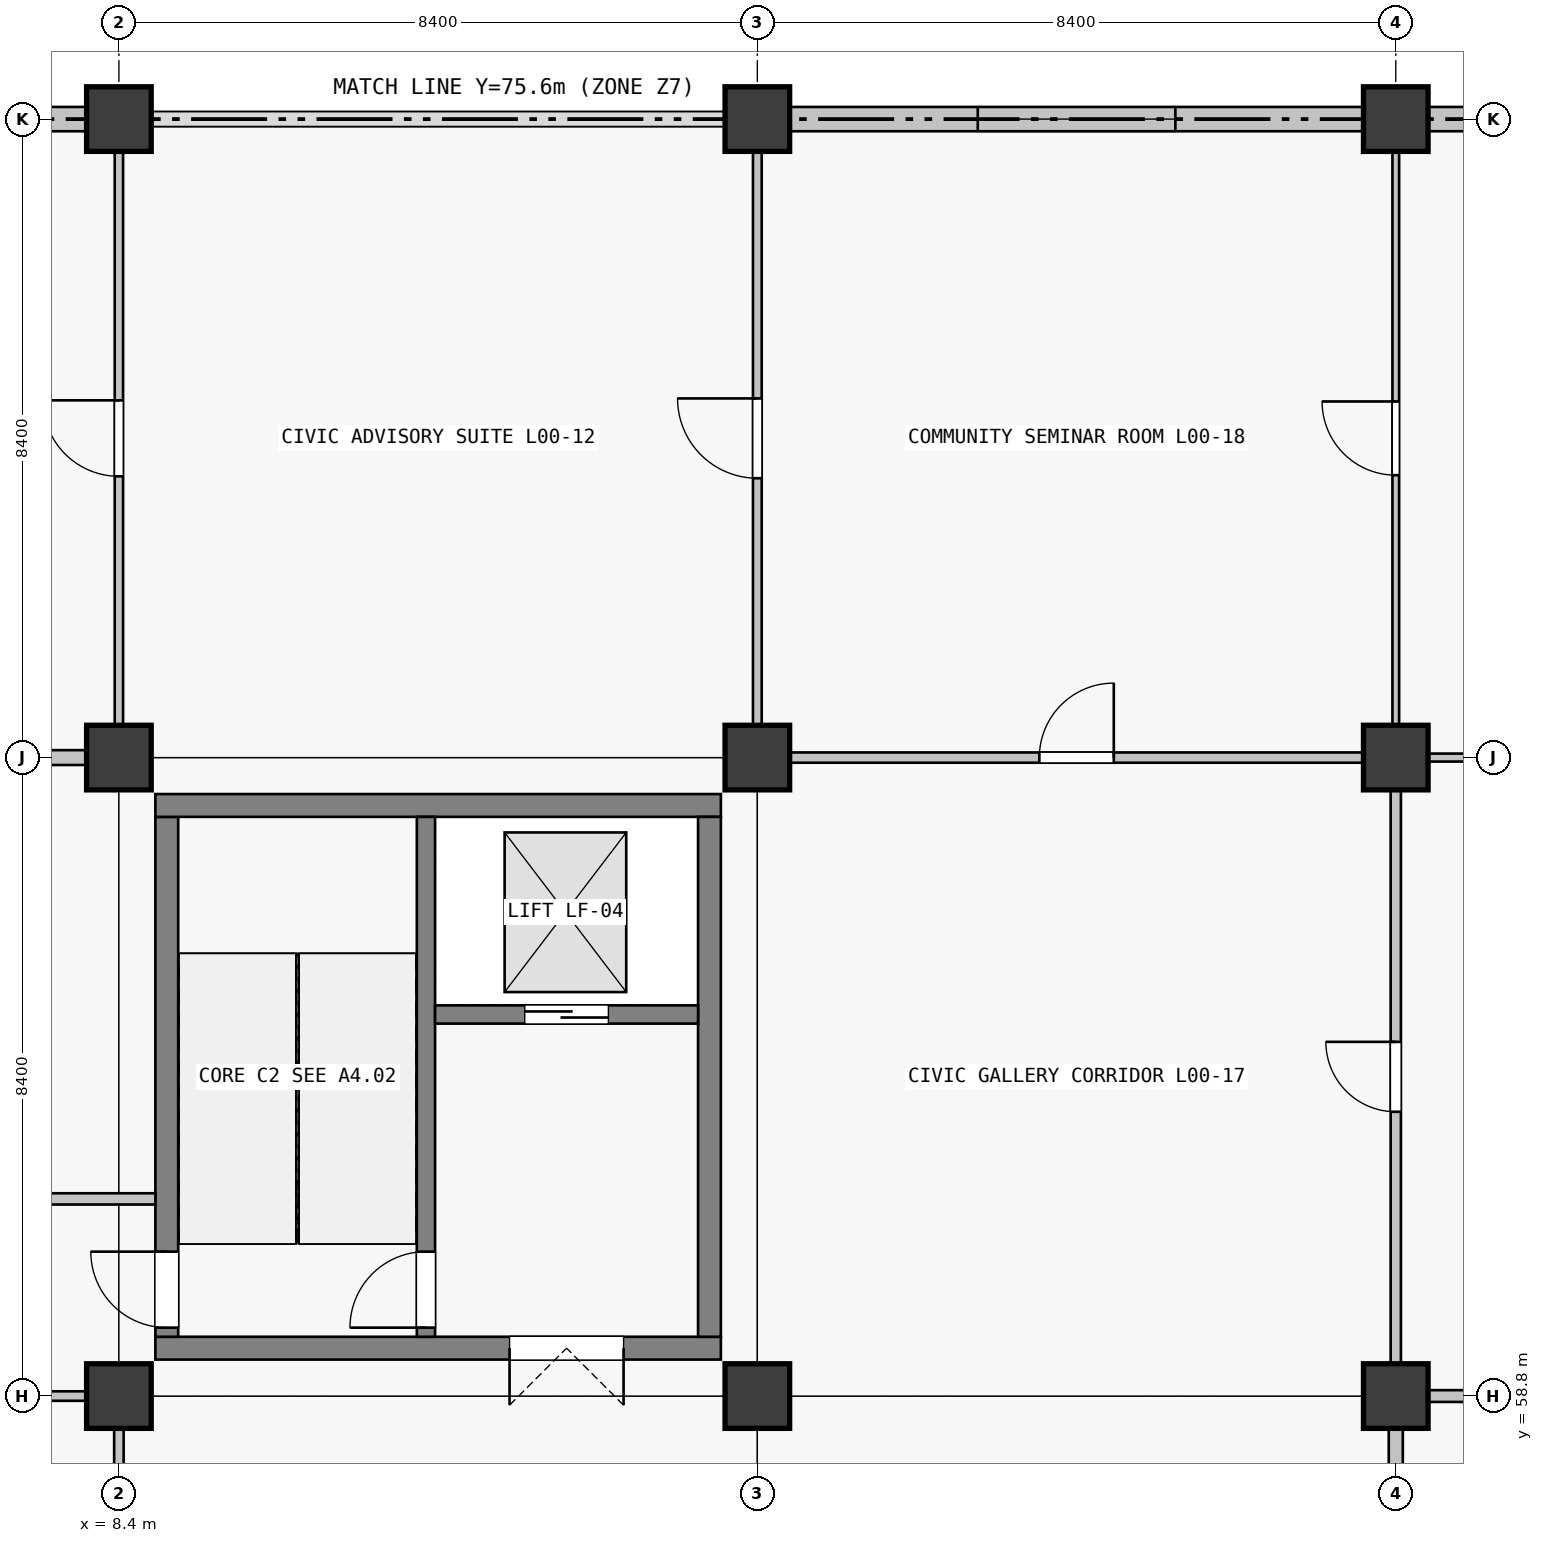
"""IFC4 building model, lengths in metres.
Left out: names, types, materials, properties, quantities, classifications, styles, units other than length and angle.
Written with IfcOpenShell. Run it as: python <this file> out.ifc"""

import sys

from ifc_helpers import new_model, si_unit, direction, frame, frame_2d, origin, origin_2d, place, context, subcontext, project, spatial, rectangle, extrude, element, fill, save


model = new_model("IFC4")
c1 = context("Model", 3, precision=1e-05, world=origin(), true_north=direction((0.0, 1.0)))
c2 = subcontext(c1, "Body", "Model", "MODEL_VIEW")
j1 = project(units=[si_unit("LENGTHUNIT", "METRE"), si_unit("PLANEANGLEUNIT", "RADIAN")], contexts=[c1])
p1 = place(None, origin())
s1 = spatial("IfcSite", under=j1, at=p1, CompositionType="ELEMENT")
p2 = place(p1, origin())
s2 = spatial("IfcBuilding", under=s1, at=p2, CompositionType="ELEMENT")
p3 = place(p2, origin())
s3 = spatial("IfcBuildingStorey", under=s2, at=p3, CompositionType="ELEMENT", Elevation=0.0)
for number, where, z_axis, x_axis in (
    (1, (8.4, 58.8, 0.0), (0.0, 0.0, 1.0), (1.0, 0.0, 0.0)),
    (2, (8.4, 67.2, 0.0), (0.0, 0.0, 1.0), (1.0, 0.0, 0.0)),
    (3, (8.4, 75.6, 0.0), (0.0, 0.0, 1.0), (1.0, 0.0, 0.0)),
    (4, (16.8, 58.8, 0.0), (0.0, 0.0, 1.0), (1.0, 0.0, 0.0)),
    (5, (16.8, 67.2, 0.0), (0.0, 0.0, 1.0), (1.0, 0.0, 0.0)),
    (6, (16.8, 75.6, 0.0), (0.0, 0.0, 1.0), (1.0, 0.0, 0.0)),
    (7, (25.2, 58.8, 0.0), (0.0, 0.0, 1.0), (1.0, 0.0, 0.0)),
    (8, (25.2, 67.2, 0.0), (0.0, 0.0, 1.0), (1.0, 0.0, 0.0)),
    (9, (25.2, 75.6, 0.0), (0.0, 0.0, 1.0), (1.0, 0.0, 0.0)),
):
    element("IfcColumn", number, at=place(p3, frame(where, z_axis=z_axis, x_axis=x_axis)), inside=s3, PredefinedType="COLUMN", context=c2, shape_type="SweptSolid", body=[
        extrude(rectangle(XDim=0.85, YDim=0.85, at=origin_2d()), origin(), (0.0, 0.0, 1.0), 5.76),
    ])
p4 = place(p3, frame((0.301, 75.6, 0.0), z_axis=(0.0, 0.0, 1.0), x_axis=(1.0, 0.0, 0.0)))
e10 = element("IfcWall", 10, at=p4, inside=s3, PredefinedType="SOLIDWALL", context=c2, shape_type="SweptSolid", body=[
    extrude(rectangle(XDim=7.673, YDim=0.32, at=frame_2d((3.836, 0.0))), origin(), (0.0, 0.0, 1.0), 4.7),
])
p5 = place(p4, frame((3.037, 0.0, 0.9)))
e11 = element("IfcOpeningElement", 11, at=p5, cuts=e10, PredefinedType="OPENING", context=c2, shape_type="SweptSolid", body=[
    extrude(rectangle(XDim=1.6, YDim=2.1, at=frame_2d((0.8, 1.05))), frame((0.0, 0.16, 0.0), z_axis=(0.0, -1.0, 0.0), x_axis=(1.0, 0.0, 0.0)), (0.0, 0.0, 1.0), 0.32),
])
p6 = place(p3, frame((17.226, 75.6, 0.0), z_axis=(0.0, 0.0, 1.0), x_axis=(1.0, 0.0, 0.0)))
e12 = element("IfcWall", 12, at=p6, inside=s3, PredefinedType="SOLIDWALL", context=c2, shape_type="SweptSolid", body=[
    extrude(rectangle(XDim=7.548, YDim=0.32, at=frame_2d((3.774, 0.0))), origin(), (0.0, 0.0, 1.0), 4.7),
])
p7 = place(p6, frame((2.474, 0.0, 0.9)))
e13 = element("IfcOpeningElement", 13, at=p7, cuts=e12, PredefinedType="OPENING", context=c2, shape_type="SweptSolid", body=[
    extrude(rectangle(XDim=2.6, YDim=2.1, at=frame_2d((1.3, 1.05))), frame((0.0, 0.16, 0.0), z_axis=(0.0, -1.0, 0.0), x_axis=(1.0, 0.0, 0.0)), (0.0, 0.0, 1.0), 0.32),
])
p8 = place(p3, frame((25.626, 75.6, 0.0), z_axis=(0.0, 0.0, 1.0), x_axis=(1.0, 0.0, 0.0)))
e14 = element("IfcWall", 14, at=p8, inside=s3, PredefinedType="SOLIDWALL", context=c2, shape_type="SweptSolid", body=[
    extrude(rectangle(XDim=7.548, YDim=0.32, at=frame_2d((3.774, 0.0))), origin(), (0.0, 0.0, 1.0), 4.7),
])
p9 = place(p8, frame((2.374, 0.0, 0.9)))
e15 = element("IfcOpeningElement", 15, at=p9, cuts=e14, PredefinedType="OPENING", context=c2, shape_type="SweptSolid", body=[
    extrude(rectangle(XDim=2.8, YDim=1.75, at=frame_2d((1.4, 0.875))), frame((0.0, 0.16, 0.0), z_axis=(0.0, -1.0, 0.0), x_axis=(1.0, 0.0, 0.0)), (0.0, 0.0, 1.0), 0.32),
])
p10 = place(p3, frame((16.32, 59.43, 0.0), z_axis=(0.0, 0.0, 1.0), x_axis=(-1.0, 0.0, 0.0)))
e16 = element("IfcWall", 16, at=p10, inside=s3, PredefinedType="SHEAR", context=c2, shape_type="SweptSolid", body=[
    extrude(rectangle(XDim=7.44, YDim=0.3, at=frame_2d((3.72, 0.0))), origin(), (0.0, 0.0, 1.0), 5.76),
])
p11 = place(p10, frame((1.28, 0.0, 0.0)))
e17 = element("IfcOpeningElement", 17, at=p11, cuts=e16, PredefinedType="OPENING", context=c2, shape_type="SweptSolid", body=[
    extrude(rectangle(XDim=1.5, YDim=2.15, at=frame_2d((0.75, 1.075))), frame((0.0, 0.15, 0.0), z_axis=(0.0, -1.0, 0.0), x_axis=(1.0, 0.0, 0.0)), (0.0, 0.0, 1.0), 0.3),
])
p12 = place(p3, frame((9.03, 59.58, 0.0), z_axis=(0.0, 0.0, 1.0), x_axis=(0.0, 1.0, 0.0)))
e18 = element("IfcWall", 18, at=p12, inside=s3, PredefinedType="SHEAR", context=c2, shape_type="SweptSolid", body=[
    extrude(rectangle(XDim=6.84, YDim=0.3, at=frame_2d((3.42, 0.0))), origin(), (0.0, 0.0, 1.0), 5.76),
])
p13 = place(p12, frame((0.12, 0.0, 0.0)))
e19 = element("IfcOpeningElement", 19, at=p13, cuts=e18, PredefinedType="OPENING", context=c2, shape_type="SweptSolid", body=[
    extrude(rectangle(XDim=1.0, YDim=2.15, at=frame_2d((0.5, 1.075))), frame((0.0, 0.15, 0.0), z_axis=(0.0, -1.0, 0.0), x_axis=(1.0, 0.0, 0.0)), (0.0, 0.0, 1.0), 0.3),
])
p14 = place(p3, frame((8.88, 66.57, 0.0), z_axis=(0.0, 0.0, 1.0), x_axis=(1.0, 0.0, 0.0)))
e20 = element("IfcWall", 20, at=p14, inside=s3, PredefinedType="SHEAR", context=c2, shape_type="SweptSolid", body=[
    extrude(rectangle(XDim=7.44, YDim=0.3, at=frame_2d((3.72, 0.0))), origin(), (0.0, 0.0, 1.0), 5.76),
])
p15 = place(p3, frame((16.17, 66.42, 0.0), z_axis=(0.0, 0.0, 1.0), x_axis=(0.0, -1.0, 0.0)))
e21 = element("IfcWall", 21, at=p15, inside=s3, PredefinedType="SHEAR", context=c2, shape_type="SweptSolid", body=[
    extrude(rectangle(XDim=6.84, YDim=0.3, at=frame_2d((3.42, 0.0))), origin(), (0.0, 0.0, 1.0), 5.76),
])
p16 = place(p3, frame((12.44, 59.58, 0.0), z_axis=(0.0, 0.0, 1.0), x_axis=(0.0, 1.0, 0.0)))
e22 = element("IfcWall", 22, at=p16, inside=s3, PredefinedType="SHEAR", context=c2, shape_type="SweptSolid", body=[
    extrude(rectangle(XDim=6.84, YDim=0.24, at=frame_2d((3.42, 0.0))), origin(), (0.0, 0.0, 1.0), 5.76),
])
p17 = place(p16, frame((0.12, 0.0, 0.0)))
e23 = element("IfcOpeningElement", 23, at=p17, cuts=e22, PredefinedType="OPENING", context=c2, shape_type="SweptSolid", body=[
    extrude(rectangle(XDim=1.0, YDim=2.15, at=frame_2d((0.5, 1.075))), frame((0.0, 0.12, 0.0), z_axis=(0.0, -1.0, 0.0), x_axis=(1.0, 0.0, 0.0)), (0.0, 0.0, 1.0), 0.24),
])
p18 = place(p3, frame((12.56, 63.82, 0.0), z_axis=(0.0, 0.0, 1.0), x_axis=(1.0, 0.0, 0.0)))
e24 = element("IfcWall", 24, at=p18, inside=s3, PredefinedType="SHEAR", context=c2, shape_type="SweptSolid", body=[
    extrude(rectangle(XDim=3.46, YDim=0.24, at=frame_2d((1.73, 0.0))), origin(), (0.0, 0.0, 1.0), 5.76),
])
p19 = place(p18, frame((1.18, 0.0, 0.0)))
e25 = element("IfcOpeningElement", 25, at=p19, cuts=e24, PredefinedType="OPENING", context=c2, shape_type="SweptSolid", body=[
    extrude(rectangle(XDim=1.1, YDim=2.15, at=frame_2d((0.55, 1.075))), frame((0.0, 0.12, 0.0), z_axis=(0.0, -1.0, 0.0), x_axis=(1.0, 0.0, 0.0)), (0.0, 0.0, 1.0), 0.24),
])
p20 = place(p3, frame((0.302, 58.8, 0.0), z_axis=(0.0, 0.0, 1.0), x_axis=(1.0, 0.0, 0.0)))
e26 = element("IfcWall", 26, at=p20, inside=s3, PredefinedType="PARTITIONING", context=c2, shape_type="SweptSolid", body=[
    extrude(rectangle(XDim=7.671, YDim=0.125, at=frame_2d((3.835, 0.0))), origin(), (0.0, 0.0, 1.0), 3.66),
])
p21 = place(p20, frame((3.316, 0.0, 0.0)))
e27 = element("IfcOpeningElement", 27, at=p21, cuts=e26, PredefinedType="OPENING", context=c2, shape_type="SweptSolid", body=[
    extrude(rectangle(XDim=1.04, YDim=2.2, at=frame_2d((0.52, 1.1))), frame((0.0, 0.062, 0.0), z_axis=(0.0, -1.0, 0.0), x_axis=(1.0, 0.0, 0.0)), (0.0, 0.0, 1.0), 0.125),
])
p22 = place(p3, frame((0.327, 67.2, 0.0), z_axis=(0.0, 0.0, 1.0), x_axis=(1.0, 0.0, 0.0)))
e28 = element("IfcWall", 28, at=p22, inside=s3, PredefinedType="PARTITIONING", context=c2, shape_type="SweptSolid", body=[
    extrude(rectangle(XDim=7.646, YDim=0.195, at=frame_2d((3.823, 0.0))), origin(), (0.0, 0.0, 1.0), 3.66),
])
p23 = place(p22, frame((3.313, 0.0, 0.0)))
e29 = element("IfcOpeningElement", 29, at=p23, cuts=e28, PredefinedType="OPENING", context=c2, shape_type="SweptSolid", body=[
    extrude(rectangle(XDim=1.02, YDim=2.2, at=frame_2d((0.51, 1.1))), frame((0.0, 0.098, 0.0), z_axis=(0.0, -1.0, 0.0), x_axis=(1.0, 0.0, 0.0)), (0.0, 0.0, 1.0), 0.195),
])
p24 = place(p3, frame((17.227, 67.2, 0.0), z_axis=(0.0, 0.0, 1.0), x_axis=(1.0, 0.0, 0.0)))
e30 = element("IfcWall", 30, at=p24, inside=s3, PredefinedType="PARTITIONING", context=c2, shape_type="SweptSolid", body=[
    extrude(rectangle(XDim=7.546, YDim=0.135, at=frame_2d((3.773, 0.0))), origin(), (0.0, 0.0, 1.0), 3.66),
])
p25 = place(p24, frame((3.283, 0.0, 0.0)))
e31 = element("IfcOpeningElement", 31, at=p25, cuts=e30, PredefinedType="OPENING", context=c2, shape_type="SweptSolid", body=[
    extrude(rectangle(XDim=0.98, YDim=2.18, at=frame_2d((0.49, 1.09))), frame((0.0, 0.067, 0.0), z_axis=(0.0, -1.0, 0.0), x_axis=(1.0, 0.0, 0.0)), (0.0, 0.0, 1.0), 0.135),
])
p26 = place(p3, frame((25.627, 58.8, 0.0), z_axis=(0.0, 0.0, 1.0), x_axis=(1.0, 0.0, 0.0)))
e32 = element("IfcWall", 32, at=p26, inside=s3, PredefinedType="PARTITIONING", context=c2, shape_type="SweptSolid", body=[
    extrude(rectangle(XDim=7.546, YDim=0.155, at=frame_2d((3.773, 0.0))), origin(), (0.0, 0.0, 1.0), 3.66),
])
p27 = place(p26, frame((3.243, 0.0, 0.0)))
e33 = element("IfcOpeningElement", 33, at=p27, cuts=e32, PredefinedType="OPENING", context=c2, shape_type="SweptSolid", body=[
    extrude(rectangle(XDim=1.06, YDim=2.25, at=frame_2d((0.53, 1.125))), frame((0.0, 0.078, 0.0), z_axis=(0.0, -1.0, 0.0), x_axis=(1.0, 0.0, 0.0)), (0.0, 0.0, 1.0), 0.155),
])
p28 = place(p3, frame((25.627, 67.2, 0.0), z_axis=(0.0, 0.0, 1.0), x_axis=(1.0, 0.0, 0.0)))
e34 = element("IfcWall", 34, at=p28, inside=s3, PredefinedType="PARTITIONING", context=c2, shape_type="SweptSolid", body=[
    extrude(rectangle(XDim=7.546, YDim=0.105, at=frame_2d((3.773, 0.0))), origin(), (0.0, 0.0, 1.0), 3.66),
])
p29 = place(p28, frame((3.248, 0.0, 0.0)))
e35 = element("IfcOpeningElement", 35, at=p29, cuts=e34, PredefinedType="OPENING", context=c2, shape_type="SweptSolid", body=[
    extrude(rectangle(XDim=1.05, YDim=2.12, at=frame_2d((0.525, 1.06))), frame((0.0, 0.052, 0.0), z_axis=(0.0, -1.0, 0.0), x_axis=(1.0, 0.0, 0.0)), (0.0, 0.0, 1.0), 0.105),
])
p30 = place(p3, frame((8.4, 50.827, 0.0), z_axis=(0.0, 0.0, 1.0), x_axis=(0.0, 1.0, 0.0)))
e36 = element("IfcWall", 36, at=p30, inside=s3, PredefinedType="PARTITIONING", context=c2, shape_type="SweptSolid", body=[
    extrude(rectangle(XDim=7.546, YDim=0.125, at=frame_2d((3.773, 0.0))), origin(), (0.0, 0.0, 1.0), 3.66),
])
p31 = place(p30, frame((3.263, 0.0, 0.0)))
e37 = element("IfcOpeningElement", 37, at=p31, cuts=e36, PredefinedType="OPENING", context=c2, shape_type="SweptSolid", body=[
    extrude(rectangle(XDim=1.02, YDim=2.2, at=frame_2d((0.51, 1.1))), frame((0.0, 0.062, 0.0), z_axis=(0.0, -1.0, 0.0), x_axis=(1.0, 0.0, 0.0)), (0.0, 0.0, 1.0), 0.125),
])
p32 = place(p3, frame((8.4, 67.627, 0.0), z_axis=(0.0, 0.0, 1.0), x_axis=(0.0, 1.0, 0.0)))
e38 = element("IfcWall", 38, at=p32, inside=s3, PredefinedType="MOVABLE", context=c2, shape_type="SweptSolid", body=[
    extrude(rectangle(XDim=7.546, YDim=0.11, at=frame_2d((3.773, 0.0))), origin(), (0.0, 0.0, 1.0), 3.66),
])
p33 = place(p32, frame((3.273, 0.0, 0.0)))
e39 = element("IfcOpeningElement", 39, at=p33, cuts=e38, PredefinedType="OPENING", context=c2, shape_type="SweptSolid", body=[
    extrude(rectangle(XDim=1.0, YDim=2.2, at=frame_2d((0.5, 1.1))), frame((0.0, 0.055, 0.0), z_axis=(0.0, -1.0, 0.0), x_axis=(1.0, 0.0, 0.0)), (0.0, 0.0, 1.0), 0.11),
])
p34 = place(p3, frame((16.8, 67.627, 0.0), z_axis=(0.0, 0.0, 1.0), x_axis=(0.0, 1.0, 0.0)))
e40 = element("IfcWall", 40, at=p34, inside=s3, PredefinedType="PARTITIONING", context=c2, shape_type="SweptSolid", body=[
    extrude(rectangle(XDim=7.546, YDim=0.115, at=frame_2d((3.773, 0.0))), origin(), (0.0, 0.0, 1.0), 3.66),
])
p35 = place(p34, frame((3.248, 0.0, 0.0)))
e41 = element("IfcOpeningElement", 41, at=p35, cuts=e40, PredefinedType="OPENING", context=c2, shape_type="SweptSolid", body=[
    extrude(rectangle(XDim=1.05, YDim=2.12, at=frame_2d((0.525, 1.06))), frame((0.0, 0.058, 0.0), z_axis=(0.0, -1.0, 0.0), x_axis=(1.0, 0.0, 0.0)), (0.0, 0.0, 1.0), 0.115),
])
p36 = place(p3, frame((25.2, 50.827, 0.0), z_axis=(0.0, 0.0, 1.0), x_axis=(0.0, 1.0, 0.0)))
e42 = element("IfcWall", 42, at=p36, inside=s3, PredefinedType="PARTITIONING", context=c2, shape_type="SweptSolid", body=[
    extrude(rectangle(XDim=7.546, YDim=0.185, at=frame_2d((3.773, 0.0))), origin(), (0.0, 0.0, 1.0), 3.66),
])
p37 = place(p36, frame((3.303, 0.0, 0.0)))
e43 = element("IfcOpeningElement", 43, at=p37, cuts=e42, PredefinedType="OPENING", context=c2, shape_type="SweptSolid", body=[
    extrude(rectangle(XDim=0.94, YDim=2.15, at=frame_2d((0.47, 1.075))), frame((0.0, 0.093, 0.0), z_axis=(0.0, -1.0, 0.0), x_axis=(1.0, 0.0, 0.0)), (0.0, 0.0, 1.0), 0.185),
])
p38 = place(p3, frame((25.2, 59.227, 0.0), z_axis=(0.0, 0.0, 1.0), x_axis=(0.0, 1.0, 0.0)))
e44 = element("IfcWall", 44, at=p38, inside=s3, PredefinedType="PARTITIONING", context=c2, shape_type="SweptSolid", body=[
    extrude(rectangle(XDim=7.546, YDim=0.135, at=frame_2d((3.773, 0.0))), origin(), (0.0, 0.0, 1.0), 3.66),
])
p39 = place(p38, frame((3.313, 0.0, 0.0)))
e45 = element("IfcOpeningElement", 45, at=p39, cuts=e44, PredefinedType="OPENING", context=c2, shape_type="SweptSolid", body=[
    extrude(rectangle(XDim=0.92, YDim=2.15, at=frame_2d((0.46, 1.075))), frame((0.0, 0.067, 0.0), z_axis=(0.0, -1.0, 0.0), x_axis=(1.0, 0.0, 0.0)), (0.0, 0.0, 1.0), 0.135),
])
p40 = place(p3, frame((25.2, 67.627, 0.0), z_axis=(0.0, 0.0, 1.0), x_axis=(0.0, 1.0, 0.0)))
e46 = element("IfcWall", 46, at=p40, inside=s3, PredefinedType="PARTITIONING", context=c2, shape_type="SweptSolid", body=[
    extrude(rectangle(XDim=7.546, YDim=0.088, at=frame_2d((3.773, 0.0))), origin(), (0.0, 0.0, 1.0), 3.66),
])
p41 = place(p40, frame((3.288, 0.0, 0.0)))
e47 = element("IfcOpeningElement", 47, at=p41, cuts=e46, PredefinedType="OPENING", context=c2, shape_type="SweptSolid", body=[
    extrude(rectangle(XDim=0.97, YDim=2.12, at=frame_2d((0.485, 1.06))), frame((0.0, 0.044, 0.0), z_axis=(0.0, -1.0, 0.0), x_axis=(1.0, 0.0, 0.0)), (0.0, 0.0, 1.0), 0.088),
])
p42 = place(p3, frame((0.16, 61.394, 0.0), z_axis=(0.0, 0.0, 1.0), x_axis=(1.0, 0.0, 0.0)))
e48 = element("IfcWall", 48, at=p42, inside=s3, PredefinedType="PARTITIONING", context=c2, shape_type="SweptSolid", body=[
    extrude(rectangle(XDim=8.72, YDim=0.148, at=frame_2d((4.36, 0.0))), origin(), (0.0, 0.0, 1.0), 3.66),
])
p43 = place(p7, origin())
e49 = element("IfcWindow", 49, at=p43, inside=s3, PartitioningType="SINGLE_PANEL", PredefinedType="WINDOW", context=c2, shape_type="SweptSolid", body=[
    extrude(rectangle(XDim=2.6, YDim=2.1, at=frame_2d((1.3, 1.05))), frame((0.0, 0.03, 0.0), z_axis=(0.0, -1.0, 0.0), x_axis=(1.0, 0.0, 0.0)), (0.0, 0.0, 1.0), 0.06),
])
fill(e13, e49)
p44 = place(p17, origin())
e50 = element("IfcDoor", 50, at=p44, inside=s3, OperationType="SINGLE_SWING_LEFT", PredefinedType="DOOR", context=c2, shape_type="SweptSolid", body=[
    extrude(rectangle(XDim=1.0, YDim=2.15, at=frame_2d((0.5, 1.075))), frame((0.0, 0.025, 0.0), z_axis=(0.0, -1.0, 0.0), x_axis=(1.0, 0.0, 0.0)), (0.0, 0.0, 1.0), 0.05),
])
fill(e23, e50)
p45 = place(p11, origin())
e51 = element("IfcDoor", 51, at=p45, inside=s3, OperationType="DOUBLE_DOOR_SINGLE_SWING", PredefinedType="DOOR", context=c2, shape_type="SweptSolid", body=[
    extrude(rectangle(XDim=1.5, YDim=2.15, at=frame_2d((0.75, 1.075))), frame((0.0, 0.025, 0.0), z_axis=(0.0, -1.0, 0.0), x_axis=(1.0, 0.0, 0.0)), (0.0, 0.0, 1.0), 0.05),
])
fill(e17, e51)
p46 = place(p13, origin())
e52 = element("IfcDoor", 52, at=p46, inside=s3, OperationType="SINGLE_SWING_RIGHT", PredefinedType="DOOR", context=c2, shape_type="SweptSolid", body=[
    extrude(rectangle(XDim=1.0, YDim=2.15, at=frame_2d((0.5, 1.075))), frame((0.0, 0.025, 0.0), z_axis=(0.0, -1.0, 0.0), x_axis=(1.0, 0.0, 0.0)), (0.0, 0.0, 1.0), 0.05),
])
fill(e19, e52)
p47 = place(p19, origin())
e53 = element("IfcDoor", 53, at=p47, inside=s3, OperationType="DOUBLE_DOOR_SLIDING", PredefinedType="DOOR", context=c2, shape_type="SweptSolid", body=[
    extrude(rectangle(XDim=1.1, YDim=2.15, at=frame_2d((0.55, 1.075))), frame((0.0, 0.025, 0.0), z_axis=(0.0, -1.0, 0.0), x_axis=(1.0, 0.0, 0.0)), (0.0, 0.0, 1.0), 0.05),
])
fill(e25, e53)
p48 = place(p25, origin())
e54 = element("IfcDoor", 54, at=p48, inside=s3, OperationType="SINGLE_SWING_RIGHT", PredefinedType="DOOR", context=c2, shape_type="SweptSolid", body=[
    extrude(rectangle(XDim=0.98, YDim=2.18, at=frame_2d((0.49, 1.09))), frame((0.0, 0.025, 0.0), z_axis=(0.0, -1.0, 0.0), x_axis=(1.0, 0.0, 0.0)), (0.0, 0.0, 1.0), 0.05),
])
fill(e31, e54)
p49 = place(p39, origin())
e55 = element("IfcDoor", 55, at=p49, inside=s3, OperationType="SINGLE_SWING_RIGHT", PredefinedType="DOOR", context=c2, shape_type="SweptSolid", body=[
    extrude(rectangle(XDim=0.92, YDim=2.15, at=frame_2d((0.46, 1.075))), frame((0.0, 0.025, 0.0), z_axis=(0.0, -1.0, 0.0), x_axis=(1.0, 0.0, 0.0)), (0.0, 0.0, 1.0), 0.05),
])
fill(e45, e55)
p50 = place(p33, origin())
e56 = element("IfcDoor", 56, at=p50, inside=s3, OperationType="SINGLE_SWING_RIGHT", PredefinedType="DOOR", context=c2, shape_type="SweptSolid", body=[
    extrude(rectangle(XDim=1.0, YDim=2.2, at=frame_2d((0.5, 1.1))), frame((0.0, 0.025, 0.0), z_axis=(0.0, -1.0, 0.0), x_axis=(1.0, 0.0, 0.0)), (0.0, 0.0, 1.0), 0.05),
])
fill(e39, e56)
p51 = place(p35, origin())
e57 = element("IfcDoor", 57, at=p51, inside=s3, OperationType="SINGLE_SWING_RIGHT", PredefinedType="DOOR", context=c2, shape_type="SweptSolid", body=[
    extrude(rectangle(XDim=1.05, YDim=2.12, at=frame_2d((0.525, 1.06))), frame((0.0, 0.025, 0.0), z_axis=(0.0, -1.0, 0.0), x_axis=(1.0, 0.0, 0.0)), (0.0, 0.0, 1.0), 0.05),
])
fill(e41, e57)
p52 = place(p41, origin())
e58 = element("IfcDoor", 58, at=p52, inside=s3, OperationType="SINGLE_SWING_RIGHT", PredefinedType="DOOR", context=c2, shape_type="SweptSolid", body=[
    extrude(rectangle(XDim=0.97, YDim=2.12, at=frame_2d((0.485, 1.06))), frame((0.0, 0.025, 0.0), z_axis=(0.0, -1.0, 0.0), x_axis=(1.0, 0.0, 0.0)), (0.0, 0.0, 1.0), 0.05),
])
fill(e47, e58)
save(model, sys.argv[1])
